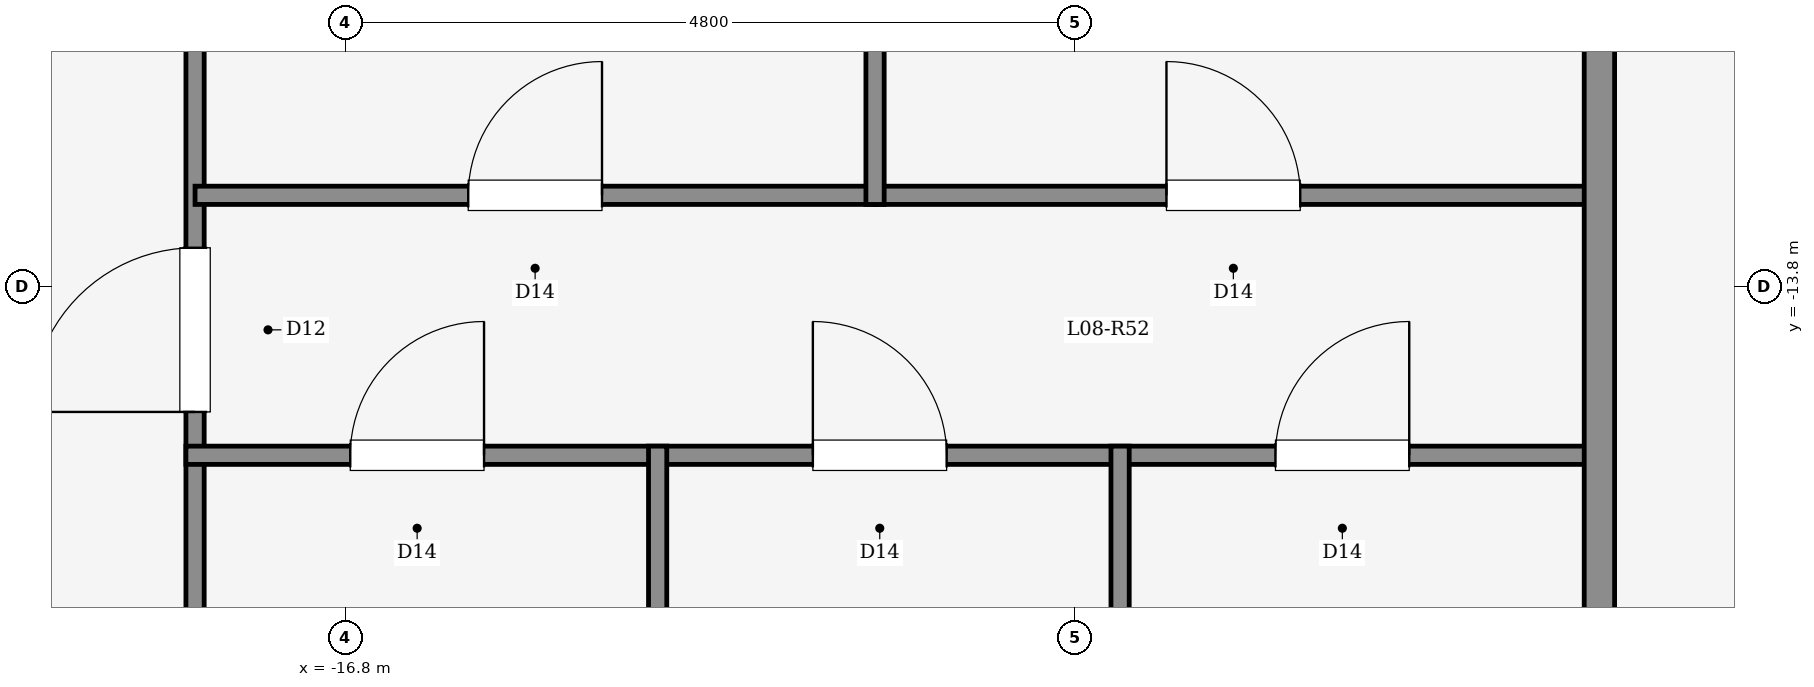
"""IFC4 building model, lengths in metres.
Left out: names, types, materials, properties, quantities, classifications, styles, units other than length and angle.
Written with IfcOpenShell. Run it as: python <this file> out.ifc"""

import sys

from ifc_helpers import new_model, si_unit, direction, frame, frame_2d, origin, place, context, subcontext, project, spatial, rectangle, extrude, element, fill, save


model = new_model("IFC4")
c1 = context("Model", 3, precision=1e-05, world=origin(), true_north=direction((0.0, 1.0)))
c2 = subcontext(c1, "Body", "Model", "MODEL_VIEW")
j1 = project(units=[si_unit("LENGTHUNIT", "METRE"), si_unit("PLANEANGLEUNIT", "RADIAN")], contexts=[c1])
p1 = place(None, origin())
s1 = spatial("IfcSite", under=j1, at=p1, CompositionType="ELEMENT")
p2 = place(p1, origin())
s2 = spatial("IfcBuilding", under=s1, at=p2, CompositionType="ELEMENT")
p3 = place(p2, frame((0.0, 0.0, 34.05)))
s3 = spatial("IfcBuildingStorey", under=s2, at=p3, CompositionType="ELEMENT", Elevation=34.05)
p4 = place(p3, frame((-17.788, -23.6, 0.0), z_axis=(0.0, 0.0, 1.0), x_axis=(0.0, 1.0, 0.0)))
e1 = element("IfcWall", 1, at=p4, inside=s3, PredefinedType="PARTITIONING", context=c2, shape_type="SweptSolid", body=[
    extrude(rectangle(XDim=13.31, YDim=0.12, at=frame_2d((6.655, 0.0))), origin(), (0.0, 0.0, 1.0), 3.1),
])
p5 = place(p4, frame((8.975, 0.0, 0.0)))
e2 = element("IfcOpeningElement", 2, at=p5, cuts=e1, PredefinedType="OPENING", context=c2, shape_type="SweptSolid", body=[
    extrude(rectangle(XDim=1.08, YDim=2.15, at=frame_2d((0.54, 1.075))), frame((0.0, 0.07, 0.0), z_axis=(0.0, -1.0, 0.0), x_axis=(1.0, 0.0, 0.0)), (0.0, 0.0, 1.0), 0.14),
])
p6 = place(p3, frame((-17.788, -13.2, 0.0), z_axis=(0.0, 0.0, 1.0), x_axis=(1.0, 0.0, 0.0)))
e3 = element("IfcWall", 3, at=p6, inside=s3, PredefinedType="PARTITIONING", context=c2, shape_type="SweptSolid", body=[
    extrude(rectangle(XDim=4.473, YDim=0.12, at=frame_2d((2.237, 0.0))), origin(), (0.0, 0.0, 1.0), 3.1),
])
p7 = place(p6, frame((1.797, 0.0, 0.0)))
e4 = element("IfcOpeningElement", 4, at=p7, cuts=e3, PredefinedType="OPENING", context=c2, shape_type="SweptSolid", body=[
    extrude(rectangle(XDim=0.88, YDim=2.1, at=frame_2d((0.44, 1.05))), frame((0.0, 0.07, 0.0), z_axis=(0.0, -1.0, 0.0), x_axis=(1.0, 0.0, 0.0)), (0.0, 0.0, 1.0), 0.14),
])
p8 = place(p3, frame((-13.315, -13.2, 0.0), z_axis=(0.0, 0.0, 1.0), x_axis=(1.0, 0.0, 0.0)))
e5 = element("IfcWall", 5, at=p8, inside=s3, PredefinedType="PARTITIONING", context=c2, shape_type="SweptSolid", body=[
    extrude(rectangle(XDim=4.715, YDim=0.12, at=frame_2d((2.357, 0.0))), origin(), (0.0, 0.0, 1.0), 3.1),
])
p9 = place(p8, frame((1.917, 0.0, 0.0)))
e6 = element("IfcOpeningElement", 6, at=p9, cuts=e5, PredefinedType="OPENING", context=c2, shape_type="SweptSolid", body=[
    extrude(rectangle(XDim=0.88, YDim=2.1, at=frame_2d((0.44, 1.05))), frame((0.0, 0.07, 0.0), z_axis=(0.0, -1.0, 0.0), x_axis=(1.0, 0.0, 0.0)), (0.0, 0.0, 1.0), 0.14),
])
p10 = place(p3, frame((-17.848, -14.91, 0.0), z_axis=(0.0, 0.0, 1.0), x_axis=(1.0, 0.0, 0.0)))
e7 = element("IfcWall", 7, at=p10, inside=s3, PredefinedType="PARTITIONING", context=c2, shape_type="SweptSolid", body=[
    extrude(rectangle(XDim=9.308, YDim=0.12, at=frame_2d((4.654, 0.0))), origin(), (0.0, 0.0, 1.0), 2.585),
])
p11 = place(p10, frame((1.081, 0.0, 0.0)))
e8 = element("IfcOpeningElement", 8, at=p11, cuts=e7, PredefinedType="OPENING", context=c2, shape_type="SweptSolid", body=[
    extrude(rectangle(XDim=0.88, YDim=2.1, at=frame_2d((0.44, 1.05))), frame((0.0, 0.07, 0.0), z_axis=(0.0, -1.0, 0.0), x_axis=(1.0, 0.0, 0.0)), (0.0, 0.0, 1.0), 0.14),
])
p12 = place(p10, frame((4.124, 0.0, 0.0)))
e9 = element("IfcOpeningElement", 9, at=p12, cuts=e7, PredefinedType="OPENING", context=c2, shape_type="SweptSolid", body=[
    extrude(rectangle(XDim=0.88, YDim=2.1, at=frame_2d((0.44, 1.05))), frame((0.0, 0.07, 0.0), z_axis=(0.0, -1.0, 0.0), x_axis=(1.0, 0.0, 0.0)), (0.0, 0.0, 1.0), 0.14),
])
p13 = place(p10, frame((7.167, 0.0, 0.0)))
e10 = element("IfcOpeningElement", 10, at=p13, cuts=e7, PredefinedType="OPENING", context=c2, shape_type="SweptSolid", body=[
    extrude(rectangle(XDim=0.88, YDim=2.1, at=frame_2d((0.44, 1.05))), frame((0.0, 0.07, 0.0), z_axis=(0.0, -1.0, 0.0), x_axis=(1.0, 0.0, 0.0)), (0.0, 0.0, 1.0), 0.14),
])
p14 = place(p3, frame((-13.315, -13.26, 0.0), z_axis=(0.0, 0.0, 1.0), x_axis=(0.0, 1.0, 0.0)))
e11 = element("IfcWall", 11, at=p14, inside=s3, PredefinedType="PARTITIONING", context=c2, shape_type="SweptSolid", body=[
    extrude(rectangle(XDim=2.97, YDim=0.12, at=frame_2d((1.485, 0.0))), origin(), (0.0, 0.0, 1.0), 3.1),
])
p15 = place(p3, frame((-14.745, -23.6, 0.0), z_axis=(0.0, 0.0, 1.0), x_axis=(0.0, 1.0, 0.0)))
e12 = element("IfcWall", 12, at=p15, inside=s3, PredefinedType="PARTITIONING", context=c2, shape_type="SweptSolid", body=[
    extrude(rectangle(XDim=8.75, YDim=0.12, at=frame_2d((4.375, 0.0))), origin(), (0.0, 0.0, 1.0), 2.435),
])
p16 = place(p3, frame((-11.703, -23.6, 0.0), z_axis=(0.0, 0.0, 1.0), x_axis=(0.0, 1.0, 0.0)))
e13 = element("IfcWall", 13, at=p16, inside=s3, PredefinedType="PARTITIONING", context=c2, shape_type="SweptSolid", body=[
    extrude(rectangle(XDim=8.75, YDim=0.12, at=frame_2d((4.375, 0.0))), origin(), (0.0, 0.0, 1.0), 3.1),
])
p17 = place(p3, frame((-8.55, -24.204, 0.0), z_axis=(0.0, 0.0, 1.0), x_axis=(0.0, 1.0, 0.0)))
e14 = element("IfcWall", 14, at=p17, inside=s3, PredefinedType="SOLIDWALL", context=c2, shape_type="SweptSolid", body=[
    extrude(rectangle(XDim=13.854, YDim=0.2, at=frame_2d((6.927, 0.0))), origin(), (0.0, 0.0, 1.0), 3.1),
])
p18 = place(p5, origin())
e15 = element("IfcDoor", 15, at=p18, inside=s3, OperationType="SINGLE_SWING_LEFT", PredefinedType="DOOR", context=c2, shape_type="SweptSolid", body=[
    extrude(rectangle(XDim=1.08, YDim=2.15, at=frame_2d((0.54, 1.075))), frame((0.0, 0.025, 0.0), z_axis=(0.0, -1.0, 0.0), x_axis=(1.0, 0.0, 0.0)), (0.0, 0.0, 1.0), 0.05),
])
fill(e2, e15)
p19 = place(p7, origin())
e16 = element("IfcDoor", 16, at=p19, inside=s3, OperationType="SINGLE_SWING_RIGHT", PredefinedType="DOOR", context=c2, shape_type="SweptSolid", body=[
    extrude(rectangle(XDim=0.88, YDim=2.1, at=frame_2d((0.44, 1.05))), frame((0.0, 0.025, 0.0), z_axis=(0.0, -1.0, 0.0), x_axis=(1.0, 0.0, 0.0)), (0.0, 0.0, 1.0), 0.05),
])
fill(e4, e16)
p20 = place(p9, origin())
e17 = element("IfcDoor", 17, at=p20, inside=s3, OperationType="SINGLE_SWING_LEFT", PredefinedType="DOOR", context=c2, shape_type="SweptSolid", body=[
    extrude(rectangle(XDim=0.88, YDim=2.1, at=frame_2d((0.44, 1.05))), frame((0.0, 0.025, 0.0), z_axis=(0.0, -1.0, 0.0), x_axis=(1.0, 0.0, 0.0)), (0.0, 0.0, 1.0), 0.05),
])
fill(e6, e17)
p21 = place(p11, origin())
e18 = element("IfcDoor", 18, at=p21, inside=s3, OperationType="SINGLE_SWING_RIGHT", PredefinedType="DOOR", context=c2, shape_type="SweptSolid", body=[
    extrude(rectangle(XDim=0.88, YDim=2.1, at=frame_2d((0.44, 1.05))), frame((0.0, 0.025, 0.0), z_axis=(0.0, -1.0, 0.0), x_axis=(1.0, 0.0, 0.0)), (0.0, 0.0, 1.0), 0.05),
])
fill(e8, e18)
p22 = place(p12, origin())
e19 = element("IfcDoor", 19, at=p22, inside=s3, OperationType="SINGLE_SWING_LEFT", PredefinedType="DOOR", context=c2, shape_type="SweptSolid", body=[
    extrude(rectangle(XDim=0.88, YDim=2.1, at=frame_2d((0.44, 1.05))), frame((0.0, 0.025, 0.0), z_axis=(0.0, -1.0, 0.0), x_axis=(1.0, 0.0, 0.0)), (0.0, 0.0, 1.0), 0.05),
])
fill(e9, e19)
p23 = place(p13, origin())
e20 = element("IfcDoor", 20, at=p23, inside=s3, OperationType="SINGLE_SWING_RIGHT", PredefinedType="DOOR", context=c2, shape_type="SweptSolid", body=[
    extrude(rectangle(XDim=0.88, YDim=2.1, at=frame_2d((0.44, 1.05))), frame((0.0, 0.025, 0.0), z_axis=(0.0, -1.0, 0.0), x_axis=(1.0, 0.0, 0.0)), (0.0, 0.0, 1.0), 0.05),
])
fill(e10, e20)
save(model, sys.argv[1])
